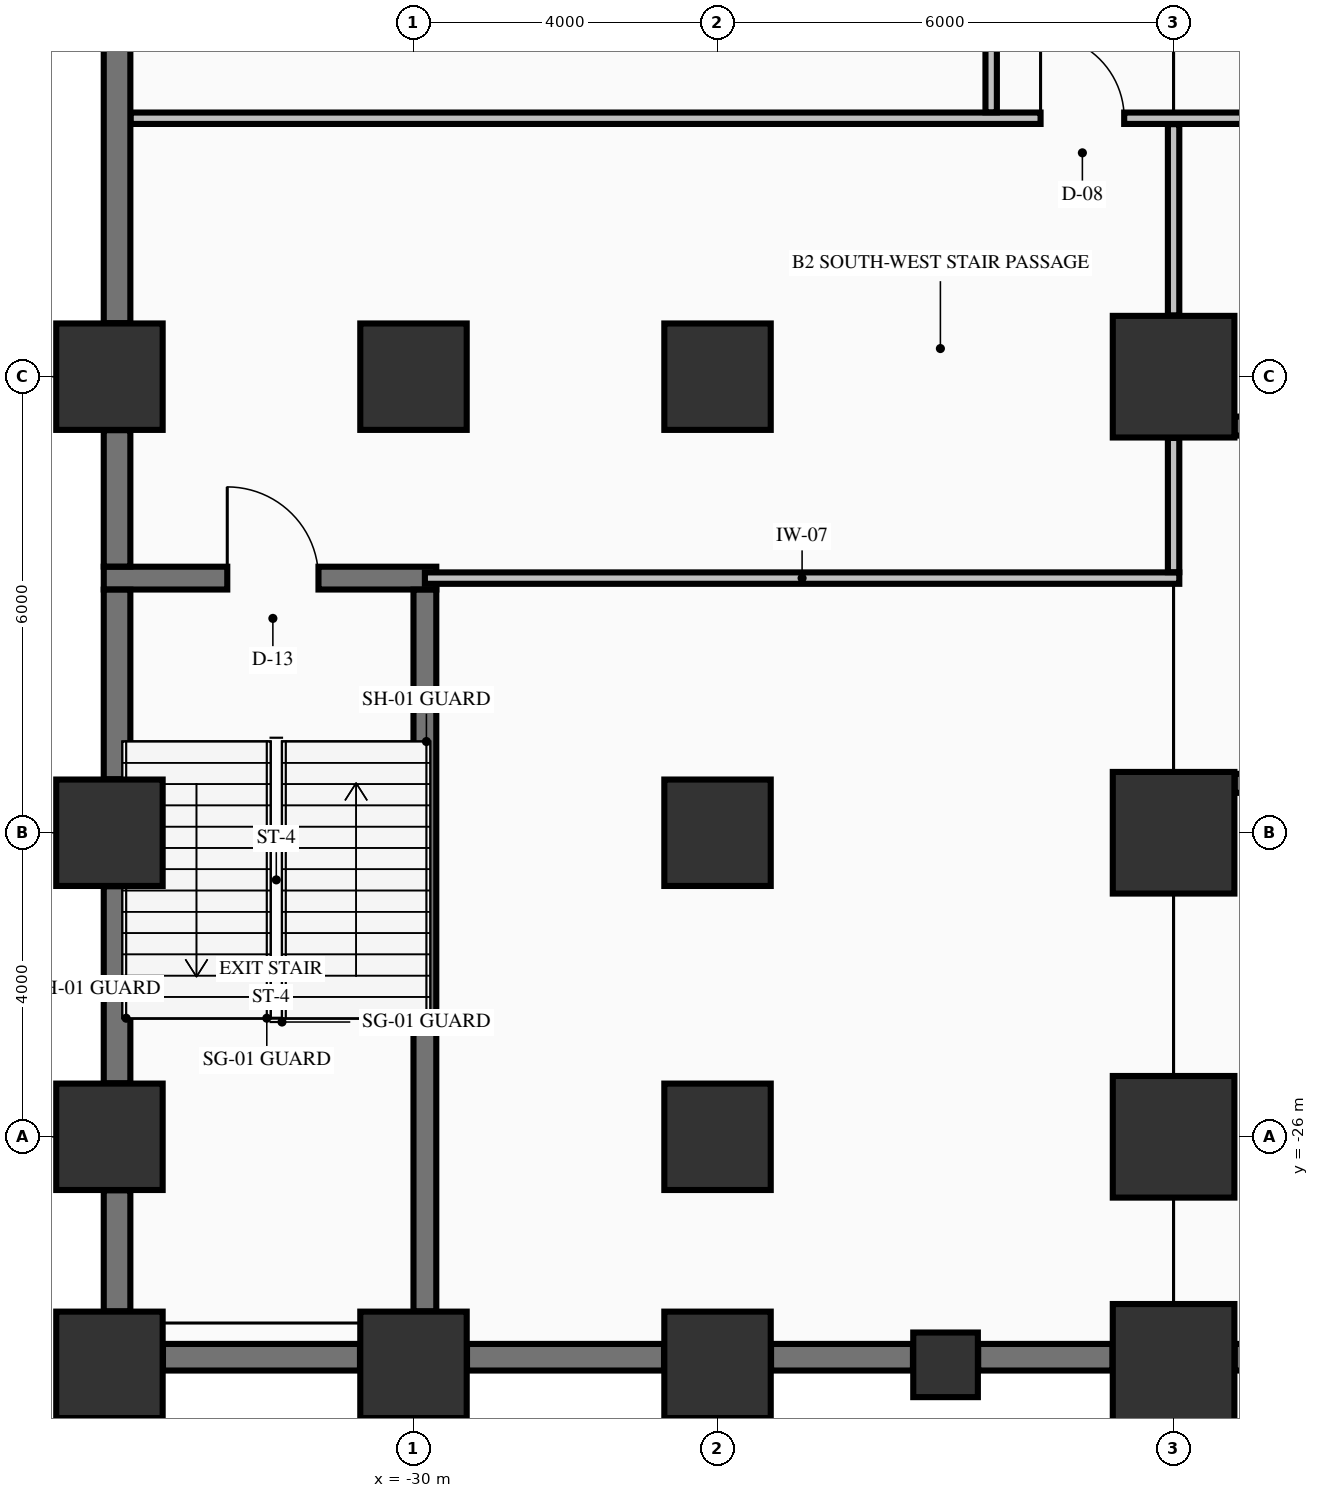
"""IFC4 building model, lengths in metres.
Left out: names, types, materials, properties, quantities, classifications, styles, units other than length and angle.
Written with IfcOpenShell. Run it as: python <this file> out.ifc"""

import sys

from ifc_helpers import new_model, si_unit, direction, frame, frame_2d, origin, origin_2d, place, context, subcontext, project, spatial, rectangle, extrude, element, fill, save


model = new_model("IFC4")
c1 = context("Model", 3, precision=1e-05, world=origin(), true_north=direction((0.0, 1.0)))
c2 = subcontext(c1, "Body", "Model", "MODEL_VIEW")
j1 = project(units=[si_unit("LENGTHUNIT", "METRE"), si_unit("PLANEANGLEUNIT", "RADIAN")], contexts=[c1])
p1 = place(None, origin())
s1 = spatial("IfcSite", under=j1, at=p1, CompositionType="ELEMENT")
p2 = place(p1, origin())
s2 = spatial("IfcBuilding", under=s1, at=p2, CompositionType="ELEMENT")
p3 = place(p2, frame((0.0, 0.0, -9.1)))
s3 = spatial("IfcBuildingStorey", under=s2, at=p3, CompositionType="ELEMENT", Elevation=-9.1)
for number, where, z_axis, x_axis in (
    (1, (-34.0, -29.0, -0.45), (0.0, 0.0, 1.0), (1.0, 0.0, 0.0)),
    (2, (-34.0, -26.0, -0.45), (0.0, 0.0, 1.0), (1.0, 0.0, 0.0)),
    (3, (-34.0, -22.0, -0.45), (0.0, 0.0, 1.0), (1.0, 0.0, 0.0)),
    (4, (-34.0, -16.0, -0.45), (0.0, 0.0, 1.0), (1.0, 0.0, 0.0)),
    (5, (-30.0, -29.0, -0.45), (0.0, 0.0, 1.0), (1.0, 0.0, 0.0)),
    (6, (-30.0, -16.0, -0.45), (0.0, 0.0, 1.0), (1.0, 0.0, 0.0)),
    (7, (-26.0, -29.0, -0.45), (0.0, 0.0, 1.0), (1.0, 0.0, 0.0)),
    (8, (-26.0, -26.0, -0.45), (0.0, 0.0, 1.0), (1.0, 0.0, 0.0)),
    (9, (-26.0, -22.0, -0.45), (0.0, 0.0, 1.0), (1.0, 0.0, 0.0)),
    (10, (-26.0, -16.0, -0.45), (0.0, 0.0, 1.0), (1.0, 0.0, 0.0)),
):
    element("IfcColumn", number, at=place(p3, frame(where, z_axis=z_axis, x_axis=x_axis)), inside=s3, PredefinedType="COLUMN", context=c2, shape_type="SweptSolid", body=[
        extrude(rectangle(XDim=1.4, YDim=1.4, at=origin_2d()), origin(), (0.0, 0.0, 1.0), 4.65),
    ])
for number, where, z_axis, x_axis in (
    (11, (-20.0, -29.0, -0.45), (0.0, 0.0, 1.0), (1.0, 0.0, 0.0)),
    (12, (-20.0, -26.0, -0.45), (0.0, 0.0, 1.0), (1.0, 0.0, 0.0)),
    (13, (-20.0, -22.0, -0.45), (0.0, 0.0, 1.0), (1.0, 0.0, 0.0)),
    (14, (-20.0, -16.0, -0.45), (0.0, 0.0, 1.0), (1.0, 0.0, 0.0)),
):
    element("IfcColumn", number, at=place(p3, frame(where, z_axis=z_axis, x_axis=x_axis)), inside=s3, PredefinedType="COLUMN", context=c2, shape_type="SweptSolid", body=[
        extrude(rectangle(XDim=1.6, YDim=1.6, at=origin_2d()), origin(), (0.0, 0.0, 1.0), 4.65),
    ])
p4 = place(p3, frame((-23.0, -29.0, -0.45), z_axis=(0.0, 0.0, 1.0), x_axis=(1.0, 0.0, 0.0)))
e15 = element("IfcColumn", 15, at=p4, inside=s3, PredefinedType="PILASTER", context=c2, shape_type="SweptSolid", body=[
    extrude(rectangle(XDim=0.85, YDim=0.85, at=origin_2d()), origin(), (0.0, 0.0, 1.0), 4.65),
])
for number, where, z_axis, x_axis in (
    (16, (-33.296, -28.9, 0.0), (0.0, 0.0, 1.0), (1.0, 0.0, 0.0)),
    (17, (-29.296, -28.9, 0.0), (0.0, 0.0, 1.0), (1.0, 0.0, 0.0)),
):
    element("IfcWall", number, at=place(p3, frame(where, z_axis=z_axis, x_axis=x_axis)), inside=s3, PredefinedType="SHEAR", context=c2, shape_type="SweptSolid", body=[
        extrude(rectangle(XDim=2.592, YDim=0.35, at=frame_2d((1.296, 0.0))), origin(), (0.0, 0.0, 1.0), 4.2),
    ])
p5 = place(p3, frame((-25.296, -28.9, 0.0), z_axis=(0.0, 0.0, 1.0), x_axis=(1.0, 0.0, 0.0)))
e18 = element("IfcWall", 18, at=p5, inside=s3, PredefinedType="SHEAR", context=c2, shape_type="SweptSolid", body=[
    extrude(rectangle(XDim=1.867, YDim=0.35, at=frame_2d((0.934, 0.0))), origin(), (0.0, 0.0, 1.0), 4.2),
])
p6 = place(p3, frame((-22.571, -28.9, 0.0), z_axis=(0.0, 0.0, 1.0), x_axis=(1.0, 0.0, 0.0)))
e19 = element("IfcWall", 19, at=p6, inside=s3, PredefinedType="SHEAR", context=c2, shape_type="SweptSolid", body=[
    extrude(rectangle(XDim=1.767, YDim=0.35, at=frame_2d((0.884, 0.0))), origin(), (0.0, 0.0, 1.0), 4.2),
])
p7 = place(p3, frame((-19.196, -28.9, 0.0), z_axis=(0.0, 0.0, 1.0), x_axis=(1.0, 0.0, 0.0)))
e20 = element("IfcWall", 20, at=p7, inside=s3, PredefinedType="SHEAR", context=c2, shape_type="SweptSolid", body=[
    extrude(rectangle(XDim=7.392, YDim=0.35, at=frame_2d((3.696, 0.0))), origin(), (0.0, 0.0, 1.0), 4.2),
])
p8 = place(p3, frame((-19.196, -21.35, 0.0), z_axis=(0.0, 0.0, 1.0), x_axis=(1.0, 0.0, 0.0)))
e21 = element("IfcWall", 21, at=p8, inside=s3, PredefinedType="SOLIDWALL", context=c2, shape_type="SweptSolid", body=[
    extrude(rectangle(XDim=7.392, YDim=0.25, at=frame_2d((3.696, 0.0))), origin(), (0.0, 0.0, 1.0), 4.2),
])
p9 = place(p3, frame((-34.075, -18.65, 0.0), z_axis=(0.0, 0.0, 1.0), x_axis=(1.0, 0.0, 0.0)))
e22 = element("IfcWall", 22, at=p9, inside=s3, PredefinedType="SHEAR", context=c2, shape_type="SweptSolid", body=[
    extrude(rectangle(XDim=4.375, YDim=0.3, at=frame_2d((2.188, 0.0))), origin(), (0.0, 0.0, 1.0), 4.2),
])
p10 = place(p9, frame((1.625, 0.0, 0.0)))
e23 = element("IfcOpeningElement", 23, at=p10, cuts=e22, PredefinedType="OPENING", context=c2, shape_type="SweptSolid", body=[
    extrude(rectangle(XDim=1.2, YDim=2.15, at=frame_2d((0.6, 1.075))), frame((0.0, 0.16, 0.0), z_axis=(0.0, -1.0, 0.0), x_axis=(1.0, 0.0, 0.0)), (0.0, 0.0, 1.0), 0.32),
])
p11 = place(p3, frame((-19.196, -16.65, 0.0), z_axis=(0.0, 0.0, 1.0), x_axis=(1.0, 0.0, 0.0)))
e24 = element("IfcWall", 24, at=p11, inside=s3, PredefinedType="SOLIDWALL", context=c2, shape_type="SweptSolid", body=[
    extrude(rectangle(XDim=7.392, YDim=0.25, at=frame_2d((3.696, 0.0))), origin(), (0.0, 0.0, 1.0), 4.2),
])
p12 = place(p3, frame((-29.85, -18.65, 0.0), z_axis=(0.0, 0.0, 1.0), x_axis=(1.0, 0.0, 0.0)))
e25 = element("IfcWall", 25, at=p12, inside=s3, PredefinedType="PARTITIONING", context=c2, shape_type="SweptSolid", body=[
    extrude(rectangle(XDim=9.925, YDim=0.15, at=frame_2d((4.962, 0.0))), origin(), (0.0, 0.0, 1.0), 4.2),
])
p13 = place(p3, frame((-33.722, -12.6, 0.0), z_axis=(0.0, 0.0, 1.0), x_axis=(1.0, 0.0, 0.0)))
e26 = element("IfcWall", 26, at=p13, inside=s3, PredefinedType="PARTITIONING", context=c2, shape_type="SweptSolid", body=[
    extrude(rectangle(XDim=56.222, YDim=0.15, at=frame_2d((28.111, 0.0))), origin(), (0.0, 0.0, 1.0), 3.74),
])
p14 = place(p13, frame((11.972, 0.0, 0.0)))
e27 = element("IfcOpeningElement", 27, at=p14, cuts=e26, PredefinedType="OPENING", context=c2, shape_type="SweptSolid", body=[
    extrude(rectangle(XDim=1.1, YDim=2.15, at=frame_2d((0.55, 1.075))), frame((0.0, 0.085, 0.0), z_axis=(0.0, -1.0, 0.0), x_axis=(1.0, 0.0, 0.0)), (0.0, 0.0, 1.0), 0.17),
])
p15 = place(p13, frame((54.372, 0.0, 0.0)))
e28 = element("IfcOpeningElement", 28, at=p15, cuts=e26, PredefinedType="OPENING", context=c2, shape_type="SweptSolid", body=[
    extrude(rectangle(XDim=1.1, YDim=2.15, at=frame_2d((0.55, 1.075))), frame((0.0, 0.085, 0.0), z_axis=(0.0, -1.0, 0.0), x_axis=(1.0, 0.0, 0.0)), (0.0, 0.0, 1.0), 0.17),
])
p16 = place(p13, frame((38.622, 0.0, 0.0)))
e29 = element("IfcOpeningElement", 29, at=p16, cuts=e26, PredefinedType="OPENING", context=c2, shape_type="SweptSolid", body=[
    extrude(rectangle(XDim=1.2, YDim=2.15, at=frame_2d((0.6, 1.075))), frame((0.0, 0.085, 0.0), z_axis=(0.0, -1.0, 0.0), x_axis=(1.0, 0.0, 0.0)), (0.0, 0.0, 1.0), 0.17),
])
p17 = place(p3, frame((-33.9, -28.296, 0.0), z_axis=(0.0, 0.0, 1.0), x_axis=(0.0, 1.0, 0.0)))
e30 = element("IfcWall", 30, at=p17, inside=s3, PredefinedType="SHEAR", context=c2, shape_type="SweptSolid", body=[
    extrude(rectangle(XDim=1.592, YDim=0.35, at=frame_2d((0.796, 0.0))), origin(), (0.0, 0.0, 1.0), 4.2),
])
p18 = place(p3, frame((-33.9, -25.296, 0.0), z_axis=(0.0, 0.0, 1.0), x_axis=(0.0, 1.0, 0.0)))
e31 = element("IfcWall", 31, at=p18, inside=s3, PredefinedType="SHEAR", context=c2, shape_type="SweptSolid", body=[
    extrude(rectangle(XDim=2.592, YDim=0.35, at=frame_2d((1.296, 0.0))), origin(), (0.0, 0.0, 1.0), 4.2),
])
p19 = place(p3, frame((-33.9, -21.296, 0.0), z_axis=(0.0, 0.0, 1.0), x_axis=(0.0, 1.0, 0.0)))
e32 = element("IfcWall", 32, at=p19, inside=s3, PredefinedType="SHEAR", context=c2, shape_type="SweptSolid", body=[
    extrude(rectangle(XDim=2.494, YDim=0.35, at=frame_2d((1.247, 0.0))), origin(), (0.0, 0.0, 1.0), 4.2),
])
p20 = place(p3, frame((-33.9, -18.498, 0.0), z_axis=(0.0, 0.0, 1.0), x_axis=(0.0, 1.0, 0.0)))
e33 = element("IfcWall", 33, at=p20, inside=s3, PredefinedType="SHEAR", context=c2, shape_type="SweptSolid", body=[
    extrude(rectangle(XDim=1.794, YDim=0.35, at=frame_2d((0.897, 0.0))), origin(), (0.0, 0.0, 1.0), 4.2),
])
p21 = place(p3, frame((-33.9, -15.296, 0.0), z_axis=(0.0, 0.0, 1.0), x_axis=(0.0, 1.0, 0.0)))
e34 = element("IfcWall", 34, at=p21, inside=s3, PredefinedType="SHEAR", context=c2, shape_type="SweptSolid", body=[
    extrude(rectangle(XDim=5.592, YDim=0.35, at=frame_2d((2.796, 0.0))), origin(), (0.0, 0.0, 1.0), 4.2),
])
p22 = place(p3, frame((-29.85, -28.296, 0.0), z_axis=(0.0, 0.0, 1.0), x_axis=(0.0, 1.0, 0.0)))
e35 = element("IfcWall", 35, at=p22, inside=s3, PredefinedType="SHEAR", context=c2, shape_type="SweptSolid", body=[
    extrude(rectangle(XDim=9.494, YDim=0.3, at=frame_2d((4.747, 0.0))), origin(), (0.0, 0.0, 1.0), 4.2),
])
p23 = place(p3, frame((-22.4, -12.522, 0.0), z_axis=(0.0, 0.0, 1.0), x_axis=(0.0, 1.0, 0.0)))
e36 = element("IfcWall", 36, at=p23, inside=s3, PredefinedType="PARTITIONING", context=c2, shape_type="SweptSolid", body=[
    extrude(rectangle(XDim=2.469, YDim=0.15, at=frame_2d((1.234, 0.0))), origin(), (0.0, 0.0, 1.0), 4.2),
])
p24 = place(p3, frame((-20.0, -18.572, 0.0), z_axis=(0.0, 0.0, 1.0), x_axis=(0.0, 1.0, 0.0)))
e37 = element("IfcWall", 37, at=p24, inside=s3, PredefinedType="PARTITIONING", context=c2, shape_type="SweptSolid", body=[
    extrude(rectangle(XDim=1.766, YDim=0.15, at=frame_2d((0.883, 0.0))), origin(), (0.0, 0.0, 1.0), 3.242),
])
p25 = place(p3, frame((-20.0, -15.194, 0.0), z_axis=(0.0, 0.0, 1.0), x_axis=(0.0, 1.0, 0.0)))
e38 = element("IfcWall", 38, at=p25, inside=s3, PredefinedType="PARTITIONING", context=c2, shape_type="SweptSolid", body=[
    extrude(rectangle(XDim=2.516, YDim=0.15, at=frame_2d((1.258, 0.0))), origin(), (0.0, 0.0, 1.0), 4.2),
])
p26 = place(p10, origin())
e39 = element("IfcDoor", 39, at=p26, inside=s3, OperationType="SINGLE_SWING_LEFT", PredefinedType="DOOR", context=c2, shape_type="SweptSolid", body=[
    extrude(rectangle(XDim=1.2, YDim=2.15, at=frame_2d((0.6, 1.075))), frame((0.0, 0.025, 0.0), z_axis=(0.0, -1.0, 0.0), x_axis=(1.0, 0.0, 0.0)), (0.0, 0.0, 1.0), 0.05),
])
fill(e23, e39)
p27 = place(p14, origin())
e40 = element("IfcDoor", 40, at=p27, inside=s3, OperationType="SINGLE_SWING_LEFT", PredefinedType="DOOR", context=c2, shape_type="SweptSolid", body=[
    extrude(rectangle(XDim=1.1, YDim=2.15, at=frame_2d((0.55, 1.075))), frame((0.0, 0.025, 0.0), z_axis=(0.0, -1.0, 0.0), x_axis=(1.0, 0.0, 0.0)), (0.0, 0.0, 1.0), 0.05),
])
fill(e27, e40)
save(model, sys.argv[1])
